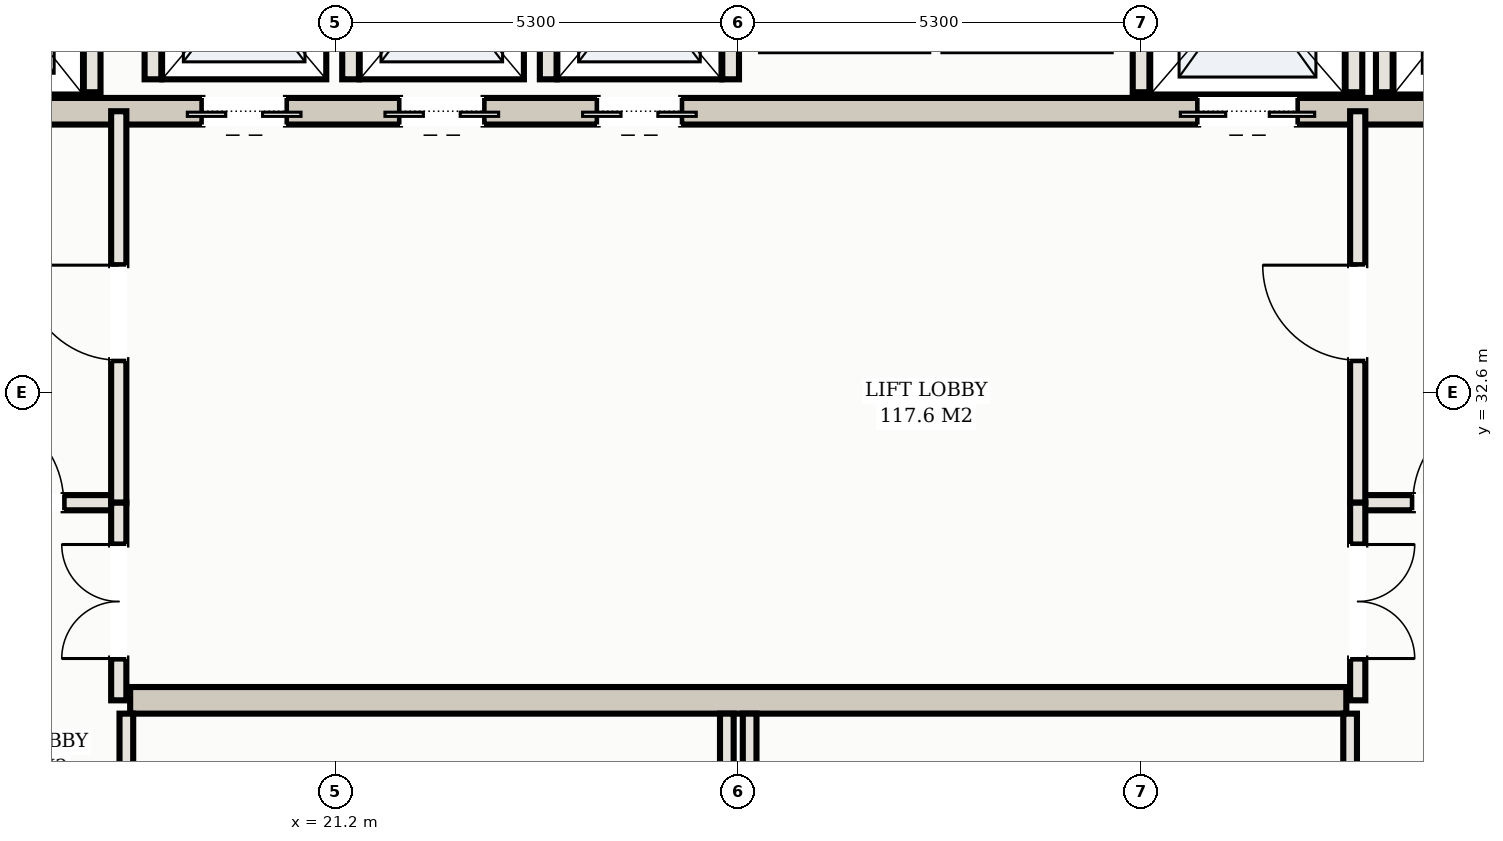
"""IFC4 building model, lengths in metres.
Left out: names, types, materials, properties, quantities, classifications, styles, units other than length and angle.
Written with IfcOpenShell. Run it as: python <this file> out.ifc"""

import sys

from ifc_helpers import new_model, si_unit, direction, frame, frame_2d, origin, place, context, subcontext, project, spatial, rectangle, extrude, element, fill, save


model = new_model("IFC4")
c1 = context("Model", 3, precision=1e-05, world=origin(), true_north=direction((0.0, 1.0)))
c2 = subcontext(c1, "Body", "Model", "MODEL_VIEW")
j1 = project(units=[si_unit("LENGTHUNIT", "METRE"), si_unit("PLANEANGLEUNIT", "RADIAN")], contexts=[c1])
p1 = place(None, origin())
s1 = spatial("IfcSite", under=j1, at=p1, CompositionType="ELEMENT")
p2 = place(p1, origin())
s2 = spatial("IfcBuilding", under=s1, at=p2, CompositionType="ELEMENT")
p3 = place(p2, frame((0.0, 0.0, 213.2)))
s3 = spatial("IfcBuildingStorey", under=s2, at=p3, CompositionType="ELEMENT", Elevation=213.2)
p4 = place(p3, frame((15.5, 36.3, 0.0), z_axis=(0.0, 0.0, 1.0), x_axis=(1.0, 0.0, 0.0)))
e1 = element("IfcWall", 1, at=p4, inside=s3, PredefinedType="SHEAR", context=c2, shape_type="SweptSolid", body=[
    extrude(rectangle(XDim=22.0, YDim=0.35, at=frame_2d((11.0, 0.0))), origin(), (0.0, 0.0, 1.0), 3.11),
])
p5 = place(p4, frame((0.65, 0.0, 0.0)))
e2 = element("IfcOpeningElement", 2, at=p5, cuts=e1, PredefinedType="OPENING", context=c2, shape_type="SweptSolid", body=[
    extrude(rectangle(XDim=1.1, YDim=2.15, at=frame_2d((0.55, 1.075))), frame((0.0, 0.185, 0.0), z_axis=(0.0, -1.0, 0.0), x_axis=(1.0, 0.0, 0.0)), (0.0, 0.0, 1.0), 0.37),
])
p6 = place(p4, frame((20.25, 0.0, 0.0)))
e3 = element("IfcOpeningElement", 3, at=p6, cuts=e1, PredefinedType="OPENING", context=c2, shape_type="SweptSolid", body=[
    extrude(rectangle(XDim=1.1, YDim=2.15, at=frame_2d((0.55, 1.075))), frame((0.0, 0.185, 0.0), z_axis=(0.0, -1.0, 0.0), x_axis=(1.0, 0.0, 0.0)), (0.0, 0.0, 1.0), 0.37),
])
p7 = place(p4, frame((17.05, 0.0, 0.0)))
e4 = element("IfcOpeningElement", 4, at=p7, cuts=e1, PredefinedType="OPENING", context=c2, shape_type="SweptSolid", body=[
    extrude(rectangle(XDim=1.3, YDim=2.2, at=frame_2d((0.65, 1.1))), frame((0.0, 0.185, 0.0), z_axis=(0.0, -1.0, 0.0), x_axis=(1.0, 0.0, 0.0)), (0.0, 0.0, 1.0), 0.37),
])
p8 = place(p4, frame((3.95, 0.0, 0.0)))
e5 = element("IfcOpeningElement", 5, at=p8, cuts=e1, PredefinedType="OPENING", context=c2, shape_type="SweptSolid", body=[
    extrude(rectangle(XDim=1.1, YDim=2.15, at=frame_2d((0.55, 1.075))), frame((0.0, 0.185, 0.0), z_axis=(0.0, -1.0, 0.0), x_axis=(1.0, 0.0, 0.0)), (0.0, 0.0, 1.0), 0.37),
])
p9 = place(p4, frame((6.55, 0.0, 0.0)))
e6 = element("IfcOpeningElement", 6, at=p9, cuts=e1, PredefinedType="OPENING", context=c2, shape_type="SweptSolid", body=[
    extrude(rectangle(XDim=1.1, YDim=2.15, at=frame_2d((0.55, 1.075))), frame((0.0, 0.185, 0.0), z_axis=(0.0, -1.0, 0.0), x_axis=(1.0, 0.0, 0.0)), (0.0, 0.0, 1.0), 0.37),
])
p10 = place(p4, frame((9.15, 0.0, 0.0)))
e7 = element("IfcOpeningElement", 7, at=p10, cuts=e1, PredefinedType="OPENING", context=c2, shape_type="SweptSolid", body=[
    extrude(rectangle(XDim=1.1, YDim=2.15, at=frame_2d((0.55, 1.075))), frame((0.0, 0.185, 0.0), z_axis=(0.0, -1.0, 0.0), x_axis=(1.0, 0.0, 0.0)), (0.0, 0.0, 1.0), 0.37),
])
p11 = place(p3, frame((18.5, 28.55, 0.0), z_axis=(0.0, 0.0, 1.0), x_axis=(1.0, 0.0, 0.0)))
e8 = element("IfcWall", 8, at=p11, inside=s3, PredefinedType="SHEAR", context=c2, shape_type="SweptSolid", body=[
    extrude(rectangle(XDim=16.0, YDim=0.35, at=frame_2d((8.0, 0.0))), origin(), (0.0, 0.0, 1.0), 3.11),
])
for number, where, z_axis, x_axis in (
    (9, (18.0, 36.55, 0.0), (0.0, 0.0, 1.0), (0.0, 1.0, 0.0)),
    (10, (35.0, 36.55, 0.0), (0.0, 0.0, 1.0), (0.0, 1.0, 0.0)),
    (11, (31.8, 36.55, 0.0), (0.0, 0.0, 1.0), (0.0, 1.0, 0.0)),
    (12, (34.6, 36.55, 0.0), (0.0, 0.0, 1.0), (0.0, 1.0, 0.0)),
):
    element("IfcWall", number, at=place(p3, frame(where, z_axis=z_axis, x_axis=x_axis)), inside=s3, PredefinedType="SOLIDWALL", context=c2, shape_type="SweptSolid", body=[
        extrude(rectangle(XDim=2.93, YDim=0.22, at=frame_2d((1.465, 0.0))), origin(), (0.0, 0.0, 1.0), 3.11),
    ])
for number, where, z_axis, x_axis in (
    (13, (18.8, 36.72, 0.0), (0.0, 0.0, 1.0), (0.0, 1.0, 0.0)),
    (14, (21.4, 36.72, 0.0), (0.0, 0.0, 1.0), (0.0, 1.0, 0.0)),
    (15, (24.0, 36.72, 0.0), (0.0, 0.0, 1.0), (0.0, 1.0, 0.0)),
    (16, (26.4, 36.72, 0.0), (0.0, 0.0, 1.0), (0.0, 1.0, 0.0)),
):
    element("IfcWall", number, at=place(p3, frame(where, z_axis=z_axis, x_axis=x_axis)), inside=s3, PredefinedType="SOLIDWALL", context=c2, shape_type="SweptSolid", body=[
        extrude(rectangle(XDim=2.56, YDim=0.22, at=frame_2d((1.28, 0.0))), origin(), (0.0, 0.0, 1.0), 3.11),
    ])
p12 = place(p3, frame((15.1, 31.15, 0.0), z_axis=(0.0, 0.0, 1.0), x_axis=(1.0, 0.0, 0.0)))
e17 = element("IfcWall", 17, at=p12, inside=s3, PredefinedType="PARTITIONING", context=c2, shape_type="SweptSolid", body=[
    extrude(rectangle(XDim=3.25, YDim=0.2, at=frame_2d((1.625, 0.0))), origin(), (0.0, 0.0, 1.0), 2.43),
])
p13 = place(p12, frame((1.275, 0.0, 0.0)))
e18 = element("IfcOpeningElement", 18, at=p13, cuts=e17, PredefinedType="OPENING", context=c2, shape_type="SweptSolid", body=[
    extrude(rectangle(XDim=1.25, YDim=2.2, at=frame_2d((0.625, 1.1))), frame((0.0, 0.11, 0.0), z_axis=(0.0, -1.0, 0.0), x_axis=(1.0, 0.0, 0.0)), (0.0, 0.0, 1.0), 0.22),
])
p14 = place(p3, frame((18.35, 31.15, 0.0), z_axis=(0.0, 0.0, 1.0), x_axis=(0.0, 1.0, 0.0)))
e19 = element("IfcWall", 19, at=p14, inside=s3, PredefinedType="PARTITIONING", context=c2, shape_type="SweptSolid", body=[
    extrude(rectangle(XDim=5.15, YDim=0.2, at=frame_2d((2.575, 0.0))), origin(), (0.0, 0.0, 1.0), 2.43),
])
p15 = place(p14, frame((1.875, 0.0, 0.0)))
e20 = element("IfcOpeningElement", 20, at=p15, cuts=e19, PredefinedType="OPENING", context=c2, shape_type="SweptSolid", body=[
    extrude(rectangle(XDim=1.25, YDim=2.2, at=frame_2d((0.625, 1.1))), frame((0.0, 0.11, 0.0), z_axis=(0.0, -1.0, 0.0), x_axis=(1.0, 0.0, 0.0)), (0.0, 0.0, 1.0), 0.22),
])
p16 = place(p3, frame((34.65, 31.15, 0.0), z_axis=(0.0, 0.0, 1.0), x_axis=(1.0, 0.0, 0.0)))
e21 = element("IfcWall", 21, at=p16, inside=s3, PredefinedType="PARTITIONING", context=c2, shape_type="SweptSolid", body=[
    extrude(rectangle(XDim=3.25, YDim=0.2, at=frame_2d((1.625, 0.0))), origin(), (0.0, 0.0, 1.0), 2.43),
])
p17 = place(p16, frame((0.725, 0.0, 0.0)))
e22 = element("IfcOpeningElement", 22, at=p17, cuts=e21, PredefinedType="OPENING", context=c2, shape_type="SweptSolid", body=[
    extrude(rectangle(XDim=1.25, YDim=2.2, at=frame_2d((0.625, 1.1))), frame((0.0, 0.11, 0.0), z_axis=(0.0, -1.0, 0.0), x_axis=(1.0, 0.0, 0.0)), (0.0, 0.0, 1.0), 0.22),
])
p18 = place(p3, frame((34.65, 31.15, 0.0), z_axis=(0.0, 0.0, 1.0), x_axis=(0.0, 1.0, 0.0)))
e23 = element("IfcWall", 23, at=p18, inside=s3, PredefinedType="PARTITIONING", context=c2, shape_type="SweptSolid", body=[
    extrude(rectangle(XDim=5.15, YDim=0.2, at=frame_2d((2.575, 0.0))), origin(), (0.0, 0.0, 1.0), 2.43),
])
p19 = place(p18, frame((1.875, 0.0, 0.0)))
e24 = element("IfcOpeningElement", 24, at=p19, cuts=e23, PredefinedType="OPENING", context=c2, shape_type="SweptSolid", body=[
    extrude(rectangle(XDim=1.25, YDim=2.2, at=frame_2d((0.625, 1.1))), frame((0.0, 0.11, 0.0), z_axis=(0.0, -1.0, 0.0), x_axis=(1.0, 0.0, 0.0)), (0.0, 0.0, 1.0), 0.22),
])
p20 = place(p3, frame((18.35, 28.55, 0.0), z_axis=(0.0, 0.0, 1.0), x_axis=(0.0, 1.0, 0.0)))
e25 = element("IfcWall", 25, at=p20, inside=s3, PredefinedType="PARTITIONING", context=c2, shape_type="SweptSolid", body=[
    extrude(rectangle(XDim=2.6, YDim=0.2, at=frame_2d((1.3, 0.0))), origin(), (0.0, 0.0, 1.0), 2.43),
])
p21 = place(p20, frame((0.55, 0.0, 0.0)))
e26 = element("IfcOpeningElement", 26, at=p21, cuts=e25, PredefinedType="OPENING", context=c2, shape_type="SweptSolid", body=[
    extrude(rectangle(XDim=1.5, YDim=2.25, at=frame_2d((0.75, 1.125))), frame((0.0, 0.11, 0.0), z_axis=(0.0, -1.0, 0.0), x_axis=(1.0, 0.0, 0.0)), (0.0, 0.0, 1.0), 0.22),
])
p22 = place(p3, frame((34.65, 28.55, 0.0), z_axis=(0.0, 0.0, 1.0), x_axis=(0.0, 1.0, 0.0)))
e27 = element("IfcWall", 27, at=p22, inside=s3, PredefinedType="PARTITIONING", context=c2, shape_type="SweptSolid", body=[
    extrude(rectangle(XDim=2.6, YDim=0.2, at=frame_2d((1.3, 0.0))), origin(), (0.0, 0.0, 1.0), 2.43),
])
p23 = place(p22, frame((0.55, 0.0, 0.0)))
e28 = element("IfcOpeningElement", 28, at=p23, cuts=e27, PredefinedType="OPENING", context=c2, shape_type="SweptSolid", body=[
    extrude(rectangle(XDim=1.5, YDim=2.25, at=frame_2d((0.75, 1.125))), frame((0.0, 0.11, 0.0), z_axis=(0.0, -1.0, 0.0), x_axis=(1.0, 0.0, 0.0)), (0.0, 0.0, 1.0), 0.22),
])
for number, where, z_axis, x_axis in (
    (29, (18.45, 25.62, 0.0), (0.0, 0.0, 1.0), (0.0, 1.0, 0.0)),
    (30, (26.35, 25.62, 0.0), (0.0, 0.0, 1.0), (0.0, 1.0, 0.0)),
    (31, (26.65, 25.62, 0.0), (0.0, 0.0, 1.0), (0.0, 1.0, 0.0)),
    (32, (34.55, 25.62, 0.0), (0.0, 0.0, 1.0), (0.0, 1.0, 0.0)),
):
    element("IfcWall", number, at=place(p3, frame(where, z_axis=z_axis, x_axis=x_axis)), inside=s3, PredefinedType="PARTITIONING", context=c2, shape_type="SweptSolid", body=[
        extrude(rectangle(XDim=2.755, YDim=0.18, at=frame_2d((1.377, 0.0))), origin(), (0.0, 0.0, 1.0), 2.43),
    ])
p24 = place(p7, frame((1.3, 0.0, 0.0), z_axis=(0.0, 0.0, 1.0), x_axis=(-1.0, 0.0, 0.0)))
e33 = element("IfcDoor", 33, at=p24, inside=s3, OperationType="DOUBLE_DOOR_SLIDING", PredefinedType="DOOR", context=c2, shape_type="SweptSolid", body=[
    extrude(rectangle(XDim=1.3, YDim=2.2, at=frame_2d((0.65, 1.1))), frame((0.0, 0.025, 0.0), z_axis=(0.0, -1.0, 0.0), x_axis=(1.0, 0.0, 0.0)), (0.0, 0.0, 1.0), 0.05),
])
fill(e4, e33)
p25 = place(p8, frame((1.1, 0.0, 0.0), z_axis=(0.0, 0.0, 1.0), x_axis=(-1.0, 0.0, 0.0)))
e34 = element("IfcDoor", 34, at=p25, inside=s3, OperationType="DOUBLE_DOOR_SLIDING", PredefinedType="DOOR", context=c2, shape_type="SweptSolid", body=[
    extrude(rectangle(XDim=1.1, YDim=2.15, at=frame_2d((0.55, 1.075))), frame((0.0, 0.025, 0.0), z_axis=(0.0, -1.0, 0.0), x_axis=(1.0, 0.0, 0.0)), (0.0, 0.0, 1.0), 0.05),
])
fill(e5, e34)
p26 = place(p9, frame((1.1, 0.0, 0.0), z_axis=(0.0, 0.0, 1.0), x_axis=(-1.0, 0.0, 0.0)))
e35 = element("IfcDoor", 35, at=p26, inside=s3, OperationType="DOUBLE_DOOR_SLIDING", PredefinedType="DOOR", context=c2, shape_type="SweptSolid", body=[
    extrude(rectangle(XDim=1.1, YDim=2.15, at=frame_2d((0.55, 1.075))), frame((0.0, 0.025, 0.0), z_axis=(0.0, -1.0, 0.0), x_axis=(1.0, 0.0, 0.0)), (0.0, 0.0, 1.0), 0.05),
])
fill(e6, e35)
p27 = place(p10, frame((1.1, 0.0, 0.0), z_axis=(0.0, 0.0, 1.0), x_axis=(-1.0, 0.0, 0.0)))
e36 = element("IfcDoor", 36, at=p27, inside=s3, OperationType="DOUBLE_DOOR_SLIDING", PredefinedType="DOOR", context=c2, shape_type="SweptSolid", body=[
    extrude(rectangle(XDim=1.1, YDim=2.15, at=frame_2d((0.55, 1.075))), frame((0.0, 0.025, 0.0), z_axis=(0.0, -1.0, 0.0), x_axis=(1.0, 0.0, 0.0)), (0.0, 0.0, 1.0), 0.05),
])
fill(e7, e36)
p28 = place(p13, origin())
e37 = element("IfcDoor", 37, at=p28, inside=s3, OperationType="SINGLE_SWING_LEFT", PredefinedType="DOOR", context=c2, shape_type="SweptSolid", body=[
    extrude(rectangle(XDim=1.25, YDim=2.2, at=frame_2d((0.625, 1.1))), frame((0.0, 0.025, 0.0), z_axis=(0.0, -1.0, 0.0), x_axis=(1.0, 0.0, 0.0)), (0.0, 0.0, 1.0), 0.05),
])
fill(e18, e37)
p29 = place(p15, origin())
e38 = element("IfcDoor", 38, at=p29, inside=s3, OperationType="SINGLE_SWING_RIGHT", PredefinedType="DOOR", context=c2, shape_type="SweptSolid", body=[
    extrude(rectangle(XDim=1.25, YDim=2.2, at=frame_2d((0.625, 1.1))), frame((0.0, 0.025, 0.0), z_axis=(0.0, -1.0, 0.0), x_axis=(1.0, 0.0, 0.0)), (0.0, 0.0, 1.0), 0.05),
])
fill(e20, e38)
p30 = place(p17, origin())
e39 = element("IfcDoor", 39, at=p30, inside=s3, OperationType="SINGLE_SWING_RIGHT", PredefinedType="DOOR", context=c2, shape_type="SweptSolid", body=[
    extrude(rectangle(XDim=1.25, YDim=2.2, at=frame_2d((0.625, 1.1))), frame((0.0, 0.025, 0.0), z_axis=(0.0, -1.0, 0.0), x_axis=(1.0, 0.0, 0.0)), (0.0, 0.0, 1.0), 0.05),
])
fill(e22, e39)
p31 = place(p19, origin())
e40 = element("IfcDoor", 40, at=p31, inside=s3, OperationType="SINGLE_SWING_RIGHT", PredefinedType="DOOR", context=c2, shape_type="SweptSolid", body=[
    extrude(rectangle(XDim=1.25, YDim=2.2, at=frame_2d((0.625, 1.1))), frame((0.0, 0.025, 0.0), z_axis=(0.0, -1.0, 0.0), x_axis=(1.0, 0.0, 0.0)), (0.0, 0.0, 1.0), 0.05),
])
fill(e24, e40)
p32 = place(p21, origin())
e41 = element("IfcDoor", 41, at=p32, inside=s3, OperationType="DOUBLE_DOOR_SINGLE_SWING", PredefinedType="DOOR", context=c2, shape_type="SweptSolid", body=[
    extrude(rectangle(XDim=1.5, YDim=2.25, at=frame_2d((0.75, 1.125))), frame((0.0, 0.025, 0.0), z_axis=(0.0, -1.0, 0.0), x_axis=(1.0, 0.0, 0.0)), (0.0, 0.0, 1.0), 0.05),
])
fill(e26, e41)
p33 = place(p23, frame((1.5, 0.0, 0.0), z_axis=(0.0, 0.0, 1.0), x_axis=(-1.0, 0.0, 0.0)))
e42 = element("IfcDoor", 42, at=p33, inside=s3, OperationType="DOUBLE_DOOR_SINGLE_SWING", PredefinedType="DOOR", context=c2, shape_type="SweptSolid", body=[
    extrude(rectangle(XDim=1.5, YDim=2.25, at=frame_2d((0.75, 1.125))), frame((0.0, 0.025, 0.0), z_axis=(0.0, -1.0, 0.0), x_axis=(1.0, 0.0, 0.0)), (0.0, 0.0, 1.0), 0.05),
])
fill(e28, e42)
save(model, sys.argv[1])
